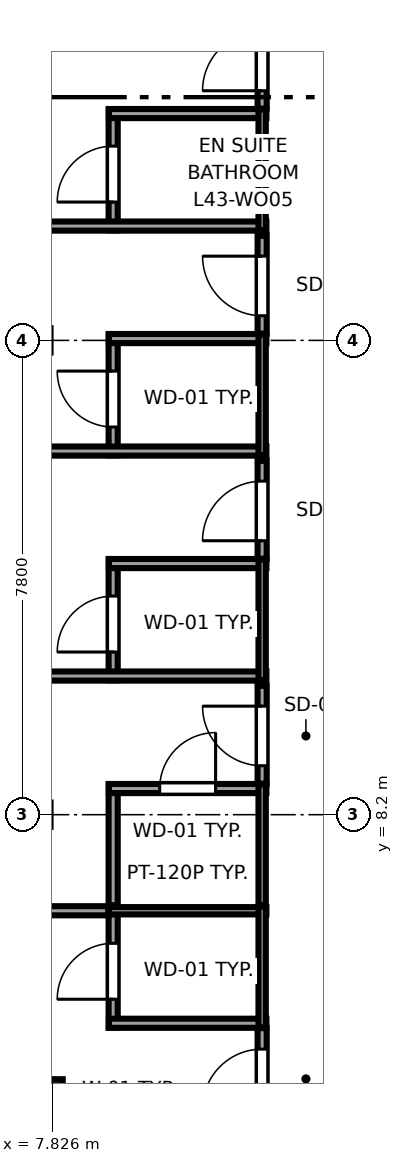
"""IFC4 building model, lengths in metres.
Left out: names, types, materials, properties, quantities, classifications, styles, units other than length and angle.
Written with IfcOpenShell. Run it as: python <this file> out.ifc"""

import sys

from ifc_helpers import new_model, si_unit, direction, frame, frame_2d, origin, origin_2d, place, context, subcontext, project, spatial, rectangle, extrude, source, transform, mapped, element, fill, save


model = new_model("IFC4")
c1 = context("Model", 3, precision=1e-05, world=origin(), true_north=direction((0.0, 1.0)))
c2 = subcontext(c1, "Body", "Model", "MODEL_VIEW")
j1 = project(units=[si_unit("LENGTHUNIT", "METRE"), si_unit("PLANEANGLEUNIT", "RADIAN")], contexts=[c1])
p1 = place(None, origin())
s1 = spatial("IfcSite", under=j1, at=p1, CompositionType="ELEMENT")
p2 = place(p1, origin())
s2 = spatial("IfcBuilding", under=s1, at=p2, CompositionType="ELEMENT")
p3 = place(p2, frame((0.0, 0.0, 164.8)))
s3 = spatial("IfcBuildingStorey", under=s2, at=p3, CompositionType="ELEMENT", Elevation=164.8)
m1 = source(origin(), c2, "Body", "SweptSolid", [
    extrude(rectangle(XDim=0.8, YDim=0.8, at=origin_2d()), origin(), (0.0, 0.0, 1.0), 3.55),
])
p4 = place(p3, frame((7.6, 3.45, 0.0), z_axis=(0.0, 0.0, 1.0), x_axis=(1.0, 0.0, 0.0)))
e1 = element("IfcColumn", 1, at=p4, inside=s3, PredefinedType="COLUMN", context=c2, shape_type="MappedRepresentation", body=[
    mapped(m1, transform((0.0, 0.0, 0.0), x_axis=(1.0, 0.0, 0.0), y_axis=(0.0, 1.0, 0.0), z_axis=(0.0, 0.0, 1.0), scale=1.0)),
])
p5 = place(p3, frame((8.83, 4.7, 0.0), z_axis=(0.0, 0.0, 1.0), x_axis=(0.0, 1.0, 0.0)))
e2 = element("IfcWall", 2, at=p5, inside=s3, PredefinedType="PARTITIONING", context=c2, shape_type="SweptSolid", body=[
    extrude(rectangle(XDim=1.99, YDim=0.15, at=frame_2d((0.995, 0.0))), origin(), (0.0, 0.0, 1.0), 3.37),
])
p6 = place(p5, frame((0.465, 0.0, 0.0)))
e3 = element("IfcOpeningElement", 3, at=p6, cuts=e2, PredefinedType="OPENING", context=c2, shape_type="SweptSolid", body=[
    extrude(rectangle(XDim=0.92, YDim=2.01, at=frame_2d((0.46, 1.005))), frame((0.0, 0.085, 0.0), z_axis=(0.0, -1.0, 0.0), x_axis=(1.0, 0.0, 0.0)), (0.0, 0.0, 1.0), 0.17),
])
p7 = place(p3, frame((8.76, 4.77, 0.0), z_axis=(0.0, 0.0, 1.0), x_axis=(1.0, 0.0, 0.0)))
e4 = element("IfcWall", 4, at=p7, inside=s3, PredefinedType="PARTITIONING", context=c2, shape_type="SweptSolid", body=[
    extrude(rectangle(XDim=2.59, YDim=0.15, at=frame_2d((1.295, 0.0))), origin(), (0.0, 0.0, 1.0), 3.37),
])
p8 = place(p3, frame((8.76, 6.62, 0.0), z_axis=(0.0, 0.0, 1.0), x_axis=(1.0, 0.0, 0.0)))
e5 = element("IfcWall", 5, at=p8, inside=s3, PredefinedType="PLUMBINGWALL", context=c2, shape_type="SweptSolid", body=[
    extrude(rectangle(XDim=2.59, YDim=0.12, at=frame_2d((1.295, 0.0))), origin(), (0.0, 0.0, 1.0), 3.37),
])
p9 = place(p3, frame((11.28, 4.7, 0.0), z_axis=(0.0, 0.0, 1.0), x_axis=(0.0, 1.0, 0.0)))
e6 = element("IfcWall", 6, at=p9, inside=s3, PredefinedType="PLUMBINGWALL", context=c2, shape_type="SweptSolid", body=[
    extrude(rectangle(XDim=1.99, YDim=0.12, at=frame_2d((0.995, 0.0))), origin(), (0.0, 0.0, 1.0), 3.37),
])
p10 = place(p3, frame((8.83, 6.71, 0.0), z_axis=(0.0, 0.0, 1.0), x_axis=(0.0, 1.0, 0.0)))
e7 = element("IfcWall", 7, at=p10, inside=s3, PredefinedType="PARTITIONING", context=c2, shape_type="SweptSolid", body=[
    extrude(rectangle(XDim=1.99, YDim=0.15, at=frame_2d((0.995, 0.0))), origin(), (0.0, 0.0, 1.0), 3.37),
])
p11 = place(p3, frame((8.76, 8.63, 0.0), z_axis=(0.0, 0.0, 1.0), x_axis=(1.0, 0.0, 0.0)))
e8 = element("IfcWall", 8, at=p11, inside=s3, PredefinedType="PARTITIONING", context=c2, shape_type="SweptSolid", body=[
    extrude(rectangle(XDim=2.59, YDim=0.15, at=frame_2d((1.295, 0.0))), origin(), (0.0, 0.0, 1.0), 3.37),
])
p12 = place(p11, frame((0.835, 0.0, 0.0)))
e9 = element("IfcOpeningElement", 9, at=p12, cuts=e8, PredefinedType="OPENING", context=c2, shape_type="SweptSolid", body=[
    extrude(rectangle(XDim=0.92, YDim=2.01, at=frame_2d((0.46, 1.005))), frame((0.0, 0.085, 0.0), z_axis=(0.0, -1.0, 0.0), x_axis=(1.0, 0.0, 0.0)), (0.0, 0.0, 1.0), 0.17),
])
p13 = place(p3, frame((11.28, 6.71, 0.0), z_axis=(0.0, 0.0, 1.0), x_axis=(0.0, 1.0, 0.0)))
e10 = element("IfcWall", 10, at=p13, inside=s3, PredefinedType="PLUMBINGWALL", context=c2, shape_type="SweptSolid", body=[
    extrude(rectangle(XDim=1.99, YDim=0.12, at=frame_2d((0.995, 0.0))), origin(), (0.0, 0.0, 1.0), 3.001),
])
p14 = place(p3, frame((8.83, 10.41, 0.0), z_axis=(0.0, 0.0, 1.0), x_axis=(0.0, 1.0, 0.0)))
e11 = element("IfcWall", 11, at=p14, inside=s3, PredefinedType="PARTITIONING", context=c2, shape_type="SweptSolid", body=[
    extrude(rectangle(XDim=1.99, YDim=0.15, at=frame_2d((0.995, 0.0))), origin(), (0.0, 0.0, 1.0), 3.37),
])
p15 = place(p14, frame((0.465, 0.0, 0.0)))
e12 = element("IfcOpeningElement", 12, at=p15, cuts=e11, PredefinedType="OPENING", context=c2, shape_type="SweptSolid", body=[
    extrude(rectangle(XDim=0.92, YDim=2.01, at=frame_2d((0.46, 1.005))), frame((0.0, 0.085, 0.0), z_axis=(0.0, -1.0, 0.0), x_axis=(1.0, 0.0, 0.0)), (0.0, 0.0, 1.0), 0.17),
])
p16 = place(p3, frame((3.005, 10.48, 0.0), z_axis=(0.0, 0.0, 1.0), x_axis=(1.0, 0.0, 0.0)))
e13 = element("IfcWall", 13, at=p16, inside=s3, PredefinedType="PARTITIONING", context=c2, shape_type="SweptSolid", body=[
    extrude(rectangle(XDim=8.345, YDim=0.15, at=frame_2d((4.173, 0.0))), origin(), (0.0, 0.0, 1.0), 3.37),
])
p17 = place(p3, frame((8.76, 12.33, 0.0), z_axis=(0.0, 0.0, 1.0), x_axis=(1.0, 0.0, 0.0)))
e14 = element("IfcWall", 14, at=p17, inside=s3, PredefinedType="PARTITIONING", context=c2, shape_type="SweptSolid", body=[
    extrude(rectangle(XDim=2.59, YDim=0.15, at=frame_2d((1.295, 0.0))), origin(), (0.0, 0.0, 1.0), 3.37),
])
p18 = place(p3, frame((11.28, 10.41, 0.0), z_axis=(0.0, 0.0, 1.0), x_axis=(0.0, 1.0, 0.0)))
e15 = element("IfcWall", 15, at=p18, inside=s3, PredefinedType="PLUMBINGWALL", context=c2, shape_type="SweptSolid", body=[
    extrude(rectangle(XDim=1.99, YDim=0.12, at=frame_2d((0.995, 0.0))), origin(), (0.0, 0.0, 1.0), 3.001),
])
p19 = place(p3, frame((8.83, 14.11, 0.0), z_axis=(0.0, 0.0, 1.0), x_axis=(0.0, 1.0, 0.0)))
e16 = element("IfcWall", 16, at=p19, inside=s3, PredefinedType="PARTITIONING", context=c2, shape_type="SweptSolid", body=[
    extrude(rectangle(XDim=1.99, YDim=0.15, at=frame_2d((0.995, 0.0))), origin(), (0.0, 0.0, 1.0), 3.37),
])
p20 = place(p19, frame((0.465, 0.0, 0.0)))
e17 = element("IfcOpeningElement", 17, at=p20, cuts=e16, PredefinedType="OPENING", context=c2, shape_type="SweptSolid", body=[
    extrude(rectangle(XDim=0.92, YDim=2.01, at=frame_2d((0.46, 1.005))), frame((0.0, 0.085, 0.0), z_axis=(0.0, -1.0, 0.0), x_axis=(1.0, 0.0, 0.0)), (0.0, 0.0, 1.0), 0.17),
])
p21 = place(p3, frame((3.005, 14.18, 0.0), z_axis=(0.0, 0.0, 1.0), x_axis=(1.0, 0.0, 0.0)))
e18 = element("IfcWall", 18, at=p21, inside=s3, PredefinedType="PARTITIONING", context=c2, shape_type="SweptSolid", body=[
    extrude(rectangle(XDim=8.345, YDim=0.15, at=frame_2d((4.173, 0.0))), origin(), (0.0, 0.0, 1.0), 3.37),
])
p22 = place(p3, frame((8.76, 16.03, 0.0), z_axis=(0.0, 0.0, 1.0), x_axis=(1.0, 0.0, 0.0)))
e19 = element("IfcWall", 19, at=p22, inside=s3, PredefinedType="PARTITIONING", context=c2, shape_type="SweptSolid", body=[
    extrude(rectangle(XDim=2.59, YDim=0.15, at=frame_2d((1.295, 0.0))), origin(), (0.0, 0.0, 1.0), 2.758),
])
p23 = place(p3, frame((11.28, 14.11, 0.0), z_axis=(0.0, 0.0, 1.0), x_axis=(0.0, 1.0, 0.0)))
e20 = element("IfcWall", 20, at=p23, inside=s3, PredefinedType="PLUMBINGWALL", context=c2, shape_type="SweptSolid", body=[
    extrude(rectangle(XDim=1.99, YDim=0.12, at=frame_2d((0.995, 0.0))), origin(), (0.0, 0.0, 1.0), 3.001),
])
p24 = place(p3, frame((8.83, 17.81, 0.0), z_axis=(0.0, 0.0, 1.0), x_axis=(0.0, 1.0, 0.0)))
e21 = element("IfcWall", 21, at=p24, inside=s3, PredefinedType="PARTITIONING", context=c2, shape_type="SweptSolid", body=[
    extrude(rectangle(XDim=1.99, YDim=0.15, at=frame_2d((0.995, 0.0))), origin(), (0.0, 0.0, 1.0), 3.37),
])
p25 = place(p24, frame((0.465, 0.0, 0.0)))
e22 = element("IfcOpeningElement", 22, at=p25, cuts=e21, PredefinedType="OPENING", context=c2, shape_type="SweptSolid", body=[
    extrude(rectangle(XDim=0.92, YDim=2.01, at=frame_2d((0.46, 1.005))), frame((0.0, 0.085, 0.0), z_axis=(0.0, -1.0, 0.0), x_axis=(1.0, 0.0, 0.0)), (0.0, 0.0, 1.0), 0.17),
])
p26 = place(p3, frame((3.005, 17.88, 0.0), z_axis=(0.0, 0.0, 1.0), x_axis=(1.0, 0.0, 0.0)))
e23 = element("IfcWall", 23, at=p26, inside=s3, PredefinedType="PARTITIONING", context=c2, shape_type="SweptSolid", body=[
    extrude(rectangle(XDim=8.345, YDim=0.15, at=frame_2d((4.173, 0.0))), origin(), (0.0, 0.0, 1.0), 3.37),
])
p27 = place(p3, frame((8.76, 19.73, 0.0), z_axis=(0.0, 0.0, 1.0), x_axis=(1.0, 0.0, 0.0)))
e24 = element("IfcWall", 24, at=p27, inside=s3, PredefinedType="PARTITIONING", context=c2, shape_type="SweptSolid", body=[
    extrude(rectangle(XDim=2.59, YDim=0.15, at=frame_2d((1.295, 0.0))), origin(), (0.0, 0.0, 1.0), 3.37),
])
p28 = place(p3, frame((11.28, 17.81, 0.0), z_axis=(0.0, 0.0, 1.0), x_axis=(0.0, 1.0, 0.0)))
e25 = element("IfcWall", 25, at=p28, inside=s3, PredefinedType="PLUMBINGWALL", context=c2, shape_type="SweptSolid", body=[
    extrude(rectangle(XDim=1.99, YDim=0.12, at=frame_2d((0.995, 0.0))), origin(), (0.0, 0.0, 1.0), 3.001),
])
p29 = place(p3, frame((11.28, 3.005, 0.0), z_axis=(0.0, 0.0, 1.0), x_axis=(0.0, 1.0, 0.0)))
e26 = element("IfcWall", 26, at=p29, inside=s3, PredefinedType="PARTITIONING", context=c2, shape_type="SweptSolid", body=[
    extrude(rectangle(XDim=1.685, YDim=0.15, at=frame_2d((0.843, 0.0))), origin(), (0.0, 0.0, 1.0), 3.37),
])
p30 = place(p29, frame((0.36, 0.0, 0.0)))
e27 = element("IfcOpeningElement", 27, at=p30, cuts=e26, PredefinedType="OPENING", context=c2, shape_type="SweptSolid", body=[
    extrude(rectangle(XDim=0.98, YDim=2.12, at=frame_2d((0.49, 1.06))), frame((0.0, 0.085, 0.0), z_axis=(0.0, -1.0, 0.0), x_axis=(1.0, 0.0, 0.0)), (0.0, 0.0, 1.0), 0.17),
])
p31 = place(p3, frame((3.057, 6.62, 0.0), z_axis=(0.0, 0.0, 1.0), x_axis=(1.0, 0.0, 0.0)))
e28 = element("IfcWall", 28, at=p31, inside=s3, PredefinedType="PARTITIONING", context=c2, shape_type="SweptSolid", body=[
    extrude(rectangle(XDim=5.693, YDim=0.15, at=frame_2d((2.847, 0.0))), origin(), (0.0, 0.0, 1.0), 3.37),
])
p32 = place(p3, frame((11.28, 8.71, 0.0), z_axis=(0.0, 0.0, 1.0), x_axis=(0.0, 1.0, 0.0)))
e29 = element("IfcWall", 29, at=p32, inside=s3, PredefinedType="PARTITIONING", context=c2, shape_type="SweptSolid", body=[
    extrude(rectangle(XDim=1.61, YDim=0.15, at=frame_2d((0.805, 0.0))), origin(), (0.0, 0.0, 1.0), 3.001),
])
p33 = place(p32, frame((0.295, 0.0, 0.0)))
e30 = element("IfcOpeningElement", 30, at=p33, cuts=e29, PredefinedType="OPENING", context=c2, shape_type="SweptSolid", body=[
    extrude(rectangle(XDim=0.98, YDim=2.12, at=frame_2d((0.49, 1.06))), frame((0.0, 0.085, 0.0), z_axis=(0.0, -1.0, 0.0), x_axis=(1.0, 0.0, 0.0)), (0.0, 0.0, 1.0), 0.17),
])
p34 = place(p3, frame((11.28, 12.41, 0.0), z_axis=(0.0, 0.0, 1.0), x_axis=(0.0, 1.0, 0.0)))
e31 = element("IfcWall", 31, at=p34, inside=s3, PredefinedType="PARTITIONING", context=c2, shape_type="SweptSolid", body=[
    extrude(rectangle(XDim=1.61, YDim=0.15, at=frame_2d((0.805, 0.0))), origin(), (0.0, 0.0, 1.0), 3.001),
])
p35 = place(p34, frame((0.295, 0.0, 0.0)))
e32 = element("IfcOpeningElement", 32, at=p35, cuts=e31, PredefinedType="OPENING", context=c2, shape_type="SweptSolid", body=[
    extrude(rectangle(XDim=0.98, YDim=2.12, at=frame_2d((0.49, 1.06))), frame((0.0, 0.085, 0.0), z_axis=(0.0, -1.0, 0.0), x_axis=(1.0, 0.0, 0.0)), (0.0, 0.0, 1.0), 0.17),
])
p36 = place(p3, frame((11.28, 16.11, 0.0), z_axis=(0.0, 0.0, 1.0), x_axis=(0.0, 1.0, 0.0)))
e33 = element("IfcWall", 33, at=p36, inside=s3, PredefinedType="PARTITIONING", context=c2, shape_type="SweptSolid", body=[
    extrude(rectangle(XDim=1.61, YDim=0.15, at=frame_2d((0.805, 0.0))), origin(), (0.0, 0.0, 1.0), 3.001),
])
p37 = place(p36, frame((0.295, 0.0, 0.0)))
e34 = element("IfcOpeningElement", 34, at=p37, cuts=e33, PredefinedType="OPENING", context=c2, shape_type="SweptSolid", body=[
    extrude(rectangle(XDim=0.98, YDim=2.12, at=frame_2d((0.49, 1.06))), frame((0.0, 0.085, 0.0), z_axis=(0.0, -1.0, 0.0), x_axis=(1.0, 0.0, 0.0)), (0.0, 0.0, 1.0), 0.17),
])
p38 = place(p3, frame((11.28, 19.81, 0.0), z_axis=(0.0, 0.0, 1.0), x_axis=(0.0, 1.0, 0.0)))
e35 = element("IfcWall", 35, at=p38, inside=s3, PredefinedType="PARTITIONING", context=c2, shape_type="SweptSolid", body=[
    extrude(rectangle(XDim=1.61, YDim=0.15, at=frame_2d((0.805, 0.0))), origin(), (0.0, 0.0, 1.0), 3.001),
])
p39 = place(p38, frame((0.295, 0.0, 0.0)))
e36 = element("IfcOpeningElement", 36, at=p39, cuts=e35, PredefinedType="OPENING", context=c2, shape_type="SweptSolid", body=[
    extrude(rectangle(XDim=0.98, YDim=2.12, at=frame_2d((0.49, 1.06))), frame((0.0, 0.085, 0.0), z_axis=(0.0, -1.0, 0.0), x_axis=(1.0, 0.0, 0.0)), (0.0, 0.0, 1.0), 0.17),
])
m2 = source(origin(), c2, "Body", "SweptSolid", [
    extrude(rectangle(XDim=0.92, YDim=2.01, at=frame_2d((0.46, 1.005))), frame((0.0, 0.025, 0.0), z_axis=(0.0, -1.0, 0.0), x_axis=(1.0, 0.0, 0.0)), (0.0, 0.0, 1.0), 0.05),
])
p40 = place(p6, origin())
e37 = element("IfcDoor", 37, at=p40, inside=s3, OperationType="SINGLE_SWING_LEFT", PredefinedType="DOOR", context=c2, shape_type="MappedRepresentation", body=[
    mapped(m2, transform((0.0, 0.0, 0.0), x_axis=(1.0, 0.0, 0.0), y_axis=(0.0, 1.0, 0.0), z_axis=(0.0, 0.0, 1.0), scale=1.0)),
])
fill(e3, e37)
p41 = place(p12, origin())
e38 = element("IfcDoor", 38, at=p41, inside=s3, OperationType="SINGLE_SWING_RIGHT", PredefinedType="DOOR", context=c2, shape_type="MappedRepresentation", body=[
    mapped(m2, transform((0.0, 0.0, 0.0), x_axis=(1.0, 0.0, 0.0), y_axis=(0.0, 1.0, 0.0), z_axis=(0.0, 0.0, 1.0), scale=1.0)),
])
fill(e9, e38)
p42 = place(p15, origin())
e39 = element("IfcDoor", 39, at=p42, inside=s3, OperationType="SINGLE_SWING_LEFT", PredefinedType="DOOR", context=c2, shape_type="MappedRepresentation", body=[
    mapped(m2, transform((0.0, 0.0, 0.0), x_axis=(1.0, 0.0, 0.0), y_axis=(0.0, 1.0, 0.0), z_axis=(0.0, 0.0, 1.0), scale=1.0)),
])
fill(e12, e39)
p43 = place(p20, origin())
e40 = element("IfcDoor", 40, at=p43, inside=s3, OperationType="SINGLE_SWING_RIGHT", PredefinedType="DOOR", context=c2, shape_type="MappedRepresentation", body=[
    mapped(m2, transform((0.0, 0.0, 0.0), x_axis=(1.0, 0.0, 0.0), y_axis=(0.0, 1.0, 0.0), z_axis=(0.0, 0.0, 1.0), scale=1.0)),
])
fill(e17, e40)
p44 = place(p25, origin())
e41 = element("IfcDoor", 41, at=p44, inside=s3, OperationType="SINGLE_SWING_LEFT", PredefinedType="DOOR", context=c2, shape_type="MappedRepresentation", body=[
    mapped(m2, transform((0.0, 0.0, 0.0), x_axis=(1.0, 0.0, 0.0), y_axis=(0.0, 1.0, 0.0), z_axis=(0.0, 0.0, 1.0), scale=1.0)),
])
fill(e22, e41)
m3 = source(origin(), c2, "Body", "SweptSolid", [
    extrude(rectangle(XDim=0.98, YDim=2.12, at=frame_2d((0.49, 1.06))), frame((0.0, 0.025, 0.0), z_axis=(0.0, -1.0, 0.0), x_axis=(1.0, 0.0, 0.0)), (0.0, 0.0, 1.0), 0.05),
])
p45 = place(p30, origin())
e42 = element("IfcDoor", 42, at=p45, inside=s3, OperationType="SINGLE_SWING_LEFT", PredefinedType="DOOR", context=c2, shape_type="MappedRepresentation", body=[
    mapped(m3, transform((0.0, 0.0, 0.0), x_axis=(1.0, 0.0, 0.0), y_axis=(0.0, 1.0, 0.0), z_axis=(0.0, 0.0, 1.0), scale=1.0)),
])
fill(e27, e42)
p46 = place(p33, origin())
e43 = element("IfcDoor", 43, at=p46, inside=s3, OperationType="SINGLE_SWING_RIGHT", PredefinedType="DOOR", context=c2, shape_type="MappedRepresentation", body=[
    mapped(m3, transform((0.0, 0.0, 0.0), x_axis=(1.0, 0.0, 0.0), y_axis=(0.0, 1.0, 0.0), z_axis=(0.0, 0.0, 1.0), scale=1.0)),
])
fill(e30, e43)
p47 = place(p35, origin())
e44 = element("IfcDoor", 44, at=p47, inside=s3, OperationType="SINGLE_SWING_LEFT", PredefinedType="DOOR", context=c2, shape_type="MappedRepresentation", body=[
    mapped(m3, transform((0.0, 0.0, 0.0), x_axis=(1.0, 0.0, 0.0), y_axis=(0.0, 1.0, 0.0), z_axis=(0.0, 0.0, 1.0), scale=1.0)),
])
fill(e32, e44)
p48 = place(p37, origin())
e45 = element("IfcDoor", 45, at=p48, inside=s3, OperationType="SINGLE_SWING_RIGHT", PredefinedType="DOOR", context=c2, shape_type="MappedRepresentation", body=[
    mapped(m3, transform((0.0, 0.0, 0.0), x_axis=(1.0, 0.0, 0.0), y_axis=(0.0, 1.0, 0.0), z_axis=(0.0, 0.0, 1.0), scale=1.0)),
])
fill(e34, e45)
p49 = place(p39, origin())
e46 = element("IfcDoor", 46, at=p49, inside=s3, OperationType="SINGLE_SWING_LEFT", PredefinedType="DOOR", context=c2, shape_type="MappedRepresentation", body=[
    mapped(m3, transform((0.0, 0.0, 0.0), x_axis=(1.0, 0.0, 0.0), y_axis=(0.0, 1.0, 0.0), z_axis=(0.0, 0.0, 1.0), scale=1.0)),
])
fill(e36, e46)
save(model, sys.argv[1])
